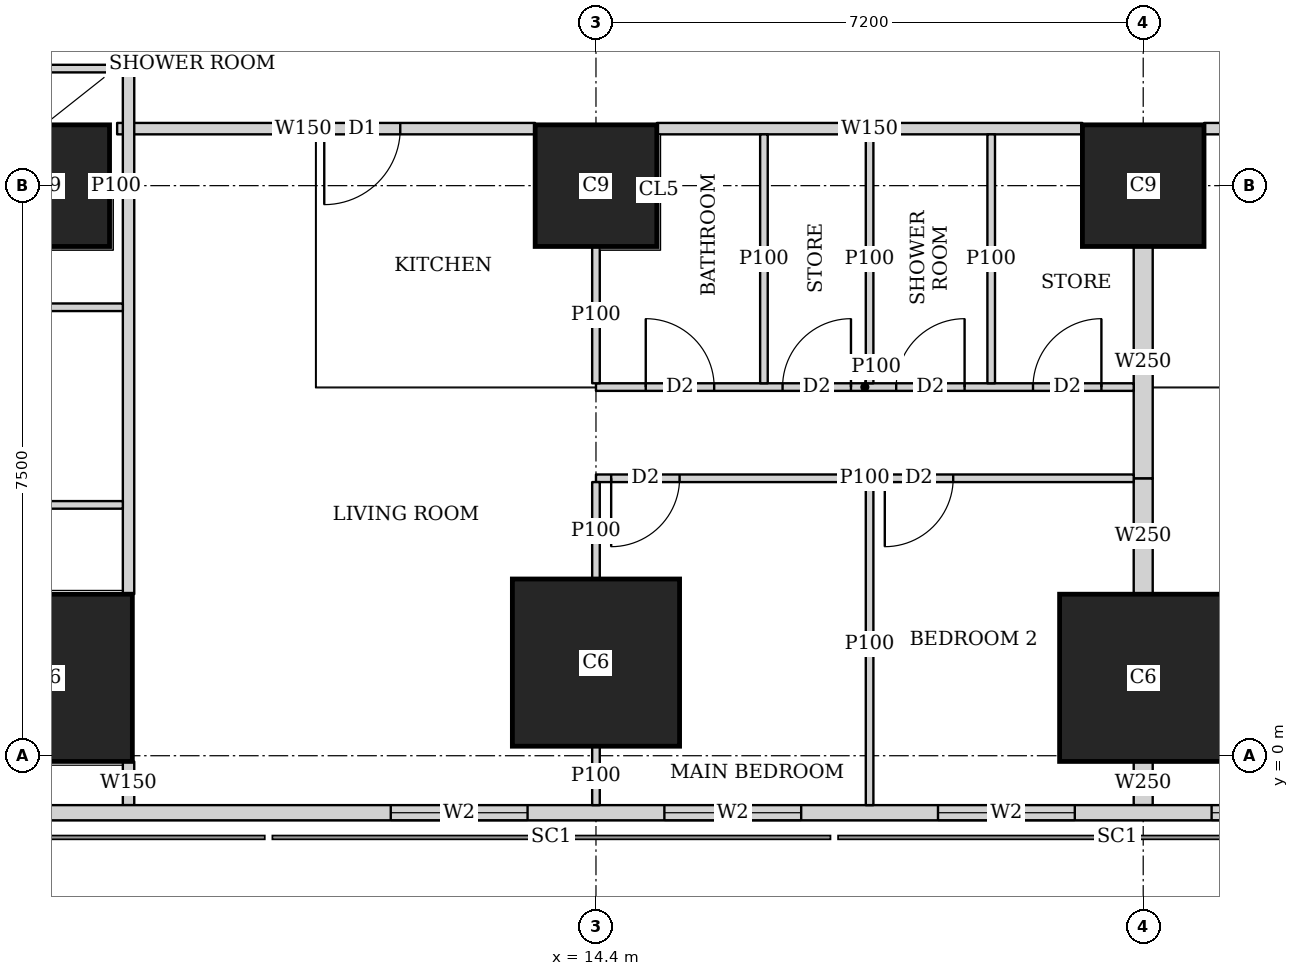
"""IFC4 building model, lengths in metres.
Left out: names, types, materials, properties, quantities, classifications, styles, units other than length and angle.
Written with IfcOpenShell. Run it as: python <this file> out.ifc"""

import sys

from ifc_helpers import new_model, si_unit, direction, frame, frame_2d, origin, origin_2d, place, context, subcontext, project, spatial, rectangle, extrude, element, fill, save


model = new_model("IFC4")
c1 = context("Model", 3, precision=1e-05, world=origin(), true_north=direction((0.0, 1.0)))
c2 = subcontext(c1, "Body", "Model", "MODEL_VIEW")
j1 = project(units=[si_unit("LENGTHUNIT", "METRE"), si_unit("PLANEANGLEUNIT", "RADIAN")], contexts=[c1])
p1 = place(None, origin())
s1 = spatial("IfcSite", under=j1, at=p1, CompositionType="ELEMENT")
p2 = place(p1, origin())
s2 = spatial("IfcBuilding", under=s1, at=p2, CompositionType="ELEMENT")
p3 = place(p2, frame((0.0, 0.0, 126.65)))
s3 = spatial("IfcBuildingStorey", under=s2, at=p3, CompositionType="ELEMENT", Elevation=126.65)
for number, where, z_axis, x_axis in (
    (1, (7.2, 1.025, 0.0), (0.0, 0.0, 1.0), (1.0, 0.0, 0.0)),
    (2, (14.4, 1.225, 0.0), (0.0, 0.0, 1.0), (1.0, 0.0, 0.0)),
    (3, (21.6, 1.025, 0.0), (0.0, 0.0, 1.0), (1.0, 0.0, 0.0)),
):
    element("IfcColumn", number, at=place(p3, frame(where, z_axis=z_axis, x_axis=x_axis)), inside=s3, PredefinedType="COLUMN", context=c2, shape_type="SweptSolid", body=[
        extrude(rectangle(XDim=2.2, YDim=2.2, at=origin_2d()), origin(), (0.0, 0.0, 1.0), 3.75),
    ])
for number, where, z_axis, x_axis in (
    (4, (7.2, 7.5, 0.0), (0.0, 0.0, 1.0), (1.0, 0.0, 0.0)),
    (5, (14.4, 7.5, 0.0), (0.0, 0.0, 1.0), (1.0, 0.0, 0.0)),
    (6, (21.6, 7.5, 0.0), (0.0, 0.0, 1.0), (1.0, 0.0, 0.0)),
):
    element("IfcColumn", number, at=place(p3, frame(where, z_axis=z_axis, x_axis=x_axis)), inside=s3, PredefinedType="COLUMN", context=c2, shape_type="SweptSolid", body=[
        extrude(rectangle(XDim=1.6, YDim=1.6, at=origin_2d()), origin(), (0.0, 0.0, 1.0), 3.75),
    ])
p4 = place(p3, frame((2.163, -0.75, 0.0), z_axis=(0.0, 0.0, 1.0), x_axis=(1.0, 0.0, 0.0)))
e7 = element("IfcWall", 7, at=p4, inside=s3, PredefinedType="SOLIDWALL", context=c2, shape_type="SweptSolid", body=[
    extrude(rectangle(XDim=45.628, YDim=0.2, at=frame_2d((22.814, 0.0))), origin(), (0.0, 0.0, 1.0), 3.45),
])
p5 = place(p4, frame((9.537, 0.0, 0.9)))
e8 = element("IfcOpeningElement", 8, at=p5, cuts=e7, PredefinedType="OPENING", context=c2, shape_type="SweptSolid", body=[
    extrude(rectangle(XDim=1.8, YDim=1.5, at=frame_2d((0.9, 0.75))), frame((0.0, 0.11, 0.0), z_axis=(0.0, -1.0, 0.0), x_axis=(1.0, 0.0, 0.0)), (0.0, 0.0, 1.0), 0.22),
])
p6 = place(p4, frame((13.137, 0.0, 0.9)))
e9 = element("IfcOpeningElement", 9, at=p6, cuts=e7, PredefinedType="OPENING", context=c2, shape_type="SweptSolid", body=[
    extrude(rectangle(XDim=1.8, YDim=1.5, at=frame_2d((0.9, 0.75))), frame((0.0, 0.11, 0.0), z_axis=(0.0, -1.0, 0.0), x_axis=(1.0, 0.0, 0.0)), (0.0, 0.0, 1.0), 0.22),
])
p7 = place(p4, frame((16.737, 0.0, 0.9)))
e10 = element("IfcOpeningElement", 10, at=p7, cuts=e7, PredefinedType="OPENING", context=c2, shape_type="SweptSolid", body=[
    extrude(rectangle(XDim=1.8, YDim=1.5, at=frame_2d((0.9, 0.75))), frame((0.0, 0.11, 0.0), z_axis=(0.0, -1.0, 0.0), x_axis=(1.0, 0.0, 0.0)), (0.0, 0.0, 1.0), 0.22),
])
p8 = place(p4, frame((20.337, 0.0, 0.9)))
e11 = element("IfcOpeningElement", 11, at=p8, cuts=e7, PredefinedType="OPENING", context=c2, shape_type="SweptSolid", body=[
    extrude(rectangle(XDim=1.8, YDim=1.5, at=frame_2d((0.9, 0.75))), frame((0.0, 0.11, 0.0), z_axis=(0.0, -1.0, 0.0), x_axis=(1.0, 0.0, 0.0)), (0.0, 0.0, 1.0), 0.22),
])
p9 = place(p4, frame((23.937, 0.0, 0.9)))
e12 = element("IfcOpeningElement", 12, at=p9, cuts=e7, PredefinedType="OPENING", context=c2, shape_type="SweptSolid", body=[
    extrude(rectangle(XDim=1.8, YDim=1.5, at=frame_2d((0.9, 0.75))), frame((0.0, 0.11, 0.0), z_axis=(0.0, -1.0, 0.0), x_axis=(1.0, 0.0, 0.0)), (0.0, 0.0, 1.0), 0.22),
])
p10 = place(p4, frame((27.537, 0.0, 0.9)))
e13 = element("IfcOpeningElement", 13, at=p10, cuts=e7, PredefinedType="OPENING", context=c2, shape_type="SweptSolid", body=[
    extrude(rectangle(XDim=1.8, YDim=1.5, at=frame_2d((0.9, 0.75))), frame((0.0, 0.11, 0.0), z_axis=(0.0, -1.0, 0.0), x_axis=(1.0, 0.0, 0.0)), (0.0, 0.0, 1.0), 0.22),
])
p11 = place(p4, frame((31.137, 0.0, 0.9)))
e14 = element("IfcOpeningElement", 14, at=p11, cuts=e7, PredefinedType="OPENING", context=c2, shape_type="SweptSolid", body=[
    extrude(rectangle(XDim=1.8, YDim=1.5, at=frame_2d((0.9, 0.75))), frame((0.0, 0.11, 0.0), z_axis=(0.0, -1.0, 0.0), x_axis=(1.0, 0.0, 0.0)), (0.0, 0.0, 1.0), 0.22),
])
p12 = place(p4, frame((34.737, 0.0, 0.9)))
e15 = element("IfcOpeningElement", 15, at=p12, cuts=e7, PredefinedType="OPENING", context=c2, shape_type="SweptSolid", body=[
    extrude(rectangle(XDim=1.8, YDim=1.5, at=frame_2d((0.9, 0.75))), frame((0.0, 0.11, 0.0), z_axis=(0.0, -1.0, 0.0), x_axis=(1.0, 0.0, 0.0)), (0.0, 0.0, 1.0), 0.22),
])
p13 = place(p3, frame((8.25, -0.65, 0.0), z_axis=(0.0, 0.0, 1.0), x_axis=(0.0, 1.0, 0.0)))
e16 = element("IfcWall", 16, at=p13, inside=s3, PredefinedType="SOLIDWALL", context=c2, shape_type="SweptSolid", body=[
    extrude(rectangle(XDim=0.574, YDim=0.15, at=frame_2d((0.287, 0.0))), origin(), (0.0, 0.0, 1.0), 3.45),
])
p14 = place(p3, frame((8.25, 2.126, 0.0), z_axis=(0.0, 0.0, 1.0), x_axis=(0.0, 1.0, 0.0)))
e17 = element("IfcWall", 17, at=p14, inside=s3, PredefinedType="SOLIDWALL", context=c2, shape_type="SweptSolid", body=[
    extrude(rectangle(XDim=40.773, YDim=0.15, at=frame_2d((20.386, 0.0))), origin(), (0.0, 0.0, 1.0), 3.45),
])
p15 = place(p14, frame((10.286, 0.0, 0.0)))
e18 = element("IfcOpeningElement", 18, at=p15, cuts=e17, PredefinedType="OPENING", context=c2, shape_type="SweptSolid", body=[
    extrude(rectangle(XDim=1.0, YDim=2.1, at=frame_2d((0.5, 1.05))), frame((0.0, 0.085, 0.0), z_axis=(0.0, -1.0, 0.0), x_axis=(1.0, 0.0, 0.0)), (0.0, 0.0, 1.0), 0.17),
])
p16 = place(p14, frame((14.461, 0.0, 0.0)))
e19 = element("IfcOpeningElement", 19, at=p16, cuts=e17, PredefinedType="OPENING", context=c2, shape_type="SweptSolid", body=[
    extrude(rectangle(XDim=1.0, YDim=2.1, at=frame_2d((0.5, 1.05))), frame((0.0, 0.085, 0.0), z_axis=(0.0, -1.0, 0.0), x_axis=(1.0, 0.0, 0.0)), (0.0, 0.0, 1.0), 0.17),
])
p17 = place(p14, frame((21.962, 0.0, 0.0)))
e20 = element("IfcOpeningElement", 20, at=p17, cuts=e17, PredefinedType="OPENING", context=c2, shape_type="SweptSolid", body=[
    extrude(rectangle(XDim=1.0, YDim=2.1, at=frame_2d((0.5, 1.05))), frame((0.0, 0.085, 0.0), z_axis=(0.0, -1.0, 0.0), x_axis=(1.0, 0.0, 0.0)), (0.0, 0.0, 1.0), 0.17),
])
p18 = place(p14, frame((29.461, 0.0, 0.0)))
e21 = element("IfcOpeningElement", 21, at=p18, cuts=e17, PredefinedType="OPENING", context=c2, shape_type="SweptSolid", body=[
    extrude(rectangle(XDim=1.0, YDim=2.1, at=frame_2d((0.5, 1.05))), frame((0.0, 0.085, 0.0), z_axis=(0.0, -1.0, 0.0), x_axis=(1.0, 0.0, 0.0)), (0.0, 0.0, 1.0), 0.17),
])
p19 = place(p3, frame((27.999, 8.25, 0.0), z_axis=(0.0, 0.0, 1.0), x_axis=(-1.0, 0.0, 0.0)))
e22 = element("IfcWall", 22, at=p19, inside=s3, PredefinedType="SOLIDWALL", context=c2, shape_type="SweptSolid", body=[
    extrude(rectangle(XDim=5.598, YDim=0.15, at=frame_2d((2.799, 0.0))), origin(), (0.0, 0.0, 1.0), 3.45),
])
p20 = place(p19, frame((3.899, 0.0, 0.0)))
e23 = element("IfcOpeningElement", 23, at=p20, cuts=e22, PredefinedType="OPENING", context=c2, shape_type="SweptSolid", body=[
    extrude(rectangle(XDim=1.0, YDim=2.1, at=frame_2d((0.5, 1.05))), frame((0.0, 0.085, 0.0), z_axis=(0.0, -1.0, 0.0), x_axis=(1.0, 0.0, 0.0)), (0.0, 0.0, 1.0), 0.17),
])
p21 = place(p3, frame((20.799, 8.25, 0.0), z_axis=(0.0, 0.0, 1.0), x_axis=(-1.0, 0.0, 0.0)))
e24 = element("IfcWall", 24, at=p21, inside=s3, PredefinedType="SOLIDWALL", context=c2, shape_type="SweptSolid", body=[
    extrude(rectangle(XDim=5.598, YDim=0.15, at=frame_2d((2.799, 0.0))), origin(), (0.0, 0.0, 1.0), 3.45),
])
p22 = place(p3, frame((13.599, 8.25, 0.0), z_axis=(0.0, 0.0, 1.0), x_axis=(-1.0, 0.0, 0.0)))
e25 = element("IfcWall", 25, at=p22, inside=s3, PredefinedType="SOLIDWALL", context=c2, shape_type="SweptSolid", body=[
    extrude(rectangle(XDim=5.499, YDim=0.15, at=frame_2d((2.75, 0.0))), origin(), (0.0, 0.0, 1.0), 3.45),
])
p23 = place(p22, frame((1.774, 0.0, 0.0)))
e26 = element("IfcOpeningElement", 26, at=p23, cuts=e25, PredefinedType="OPENING", context=c2, shape_type="SweptSolid", body=[
    extrude(rectangle(XDim=1.0, YDim=2.1, at=frame_2d((0.5, 1.05))), frame((0.0, 0.085, 0.0), z_axis=(0.0, -1.0, 0.0), x_axis=(1.0, 0.0, 0.0)), (0.0, 0.0, 1.0), 0.17),
])
p24 = place(p3, frame((8.001, 7.5, 0.0), z_axis=(0.0, 0.0, 1.0), x_axis=(1.0, 0.0, 0.0)))
e27 = element("IfcWall", 27, at=p24, inside=s3, PredefinedType="PARTITIONING", context=c2, shape_type="SweptSolid", body=[
    extrude(rectangle(XDim=0.174, YDim=0.1, at=frame_2d((0.087, 0.0))), origin(), (0.0, 0.0, 1.0), 3.45),
])
for number, where, z_axis, x_axis in (
    (28, (4.9, 9.04, 0.0), (0.0, 0.0, 1.0), (1.0, 0.0, 0.0)),
    (29, (4.9, 5.9, 0.0), (0.0, 0.0, 1.0), (1.0, 0.0, 0.0)),
):
    element("IfcWall", number, at=place(p3, frame(where, z_axis=z_axis, x_axis=x_axis)), inside=s3, PredefinedType="PARTITIONING", context=c2, shape_type="SweptSolid", body=[
        extrude(rectangle(XDim=3.275, YDim=0.1, at=frame_2d((1.638, 0.0))), origin(), (0.0, 0.0, 1.0), 3.45),
    ])
p25 = place(p3, frame((21.475, 3.65, 0.0), z_axis=(0.0, 0.0, 1.0), x_axis=(-1.0, 0.0, 0.0)))
e30 = element("IfcWall", 30, at=p25, inside=s3, PredefinedType="PARTITIONING", context=c2, shape_type="SweptSolid", body=[
    extrude(rectangle(XDim=7.075, YDim=0.1, at=frame_2d((3.538, 0.0))), origin(), (0.0, 0.0, 1.0), 3.45),
])
p26 = place(p25, frame((5.975, 0.0, 0.0)))
e31 = element("IfcOpeningElement", 31, at=p26, cuts=e30, PredefinedType="OPENING", context=c2, shape_type="SweptSolid", body=[
    extrude(rectangle(XDim=0.9, YDim=2.1, at=frame_2d((0.45, 1.05))), frame((0.0, 0.06, 0.0), z_axis=(0.0, -1.0, 0.0), x_axis=(1.0, 0.0, 0.0)), (0.0, 0.0, 1.0), 0.12),
])
p27 = place(p25, frame((2.375, 0.0, 0.0)))
e32 = element("IfcOpeningElement", 32, at=p27, cuts=e30, PredefinedType="OPENING", context=c2, shape_type="SweptSolid", body=[
    extrude(rectangle(XDim=0.9, YDim=2.1, at=frame_2d((0.45, 1.05))), frame((0.0, 0.06, 0.0), z_axis=(0.0, -1.0, 0.0), x_axis=(1.0, 0.0, 0.0)), (0.0, 0.0, 1.0), 0.12),
])
p28 = place(p3, frame((21.475, 4.85, 0.0), z_axis=(0.0, 0.0, 1.0), x_axis=(-1.0, 0.0, 0.0)))
e33 = element("IfcWall", 33, at=p28, inside=s3, PredefinedType="PARTITIONING", context=c2, shape_type="SweptSolid", body=[
    extrude(rectangle(XDim=7.075, YDim=0.1, at=frame_2d((3.538, 0.0))), origin(), (0.0, 0.0, 1.0), 3.45),
])
p29 = place(p28, frame((5.52, 0.0, 0.0)))
e34 = element("IfcOpeningElement", 34, at=p29, cuts=e33, PredefinedType="OPENING", context=c2, shape_type="SweptSolid", body=[
    extrude(rectangle(XDim=0.9, YDim=2.1, at=frame_2d((0.45, 1.05))), frame((0.0, 0.06, 0.0), z_axis=(0.0, -1.0, 0.0), x_axis=(1.0, 0.0, 0.0)), (0.0, 0.0, 1.0), 0.12),
])
p30 = place(p28, frame((2.225, 0.0, 0.0)))
e35 = element("IfcOpeningElement", 35, at=p30, cuts=e33, PredefinedType="OPENING", context=c2, shape_type="SweptSolid", body=[
    extrude(rectangle(XDim=0.9, YDim=2.1, at=frame_2d((0.45, 1.05))), frame((0.0, 0.06, 0.0), z_axis=(0.0, -1.0, 0.0), x_axis=(1.0, 0.0, 0.0)), (0.0, 0.0, 1.0), 0.12),
])
p31 = place(p28, frame((3.72, 0.0, 0.0)))
e36 = element("IfcOpeningElement", 36, at=p31, cuts=e33, PredefinedType="OPENING", context=c2, shape_type="SweptSolid", body=[
    extrude(rectangle(XDim=0.9, YDim=2.1, at=frame_2d((0.45, 1.05))), frame((0.0, 0.06, 0.0), z_axis=(0.0, -1.0, 0.0), x_axis=(1.0, 0.0, 0.0)), (0.0, 0.0, 1.0), 0.12),
])
p32 = place(p28, frame((0.425, 0.0, 0.0)))
e37 = element("IfcOpeningElement", 37, at=p32, cuts=e33, PredefinedType="OPENING", context=c2, shape_type="SweptSolid", body=[
    extrude(rectangle(XDim=0.9, YDim=2.1, at=frame_2d((0.45, 1.05))), frame((0.0, 0.06, 0.0), z_axis=(0.0, -1.0, 0.0), x_axis=(1.0, 0.0, 0.0)), (0.0, 0.0, 1.0), 0.12),
])
p33 = place(p3, frame((14.4, -0.65, 0.0), z_axis=(0.0, 0.0, 1.0), x_axis=(0.0, 1.0, 0.0)))
e38 = element("IfcWall", 38, at=p33, inside=s3, PredefinedType="PARTITIONING", context=c2, shape_type="SweptSolid", body=[
    extrude(rectangle(XDim=0.774, YDim=0.1, at=frame_2d((0.387, 0.0))), origin(), (0.0, 0.0, 1.0), 3.45),
])
p34 = place(p3, frame((14.4, 2.326, 0.0), z_axis=(0.0, 0.0, 1.0), x_axis=(0.0, 1.0, 0.0)))
e39 = element("IfcWall", 39, at=p34, inside=s3, PredefinedType="PARTITIONING", context=c2, shape_type="SweptSolid", body=[
    extrude(rectangle(XDim=1.274, YDim=0.1, at=frame_2d((0.637, 0.0))), origin(), (0.0, 0.0, 1.0), 3.45),
])
p35 = place(p3, frame((18.0, -0.65, 0.0), z_axis=(0.0, 0.0, 1.0), x_axis=(0.0, 1.0, 0.0)))
e40 = element("IfcWall", 40, at=p35, inside=s3, PredefinedType="PARTITIONING", context=c2, shape_type="SweptSolid", body=[
    extrude(rectangle(XDim=4.25, YDim=0.1, at=frame_2d((2.125, 0.0))), origin(), (0.0, 0.0, 1.0), 2.15),
])
p36 = place(p3, frame((14.4, 4.9, 0.0), z_axis=(0.0, 0.0, 1.0), x_axis=(0.0, 1.0, 0.0)))
e41 = element("IfcWall", 41, at=p36, inside=s3, PredefinedType="PARTITIONING", context=c2, shape_type="SweptSolid", body=[
    extrude(rectangle(XDim=1.799, YDim=0.1, at=frame_2d((0.899, 0.0))), origin(), (0.0, 0.0, 1.0), 3.45),
])
for number, where, z_axis, x_axis in (
    (42, (18.0, 4.9, 0.0), (0.0, 0.0, 1.0), (0.0, 1.0, 0.0)),
    (43, (16.61, 4.9, 0.0), (0.0, 0.0, 1.0), (0.0, 1.0, 0.0)),
    (44, (19.6, 4.9, 0.0), (0.0, 0.0, 1.0), (0.0, 1.0, 0.0)),
):
    element("IfcWall", number, at=place(p3, frame(where, z_axis=z_axis, x_axis=x_axis)), inside=s3, PredefinedType="PARTITIONING", context=c2, shape_type="SweptSolid", body=[
        extrude(rectangle(XDim=3.275, YDim=0.1, at=frame_2d((1.638, 0.0))), origin(), (0.0, 0.0, 1.0), 3.45),
    ])
p37 = place(p3, frame((21.6, -0.65, 0.0), z_axis=(0.0, 0.0, 1.0), x_axis=(0.0, 1.0, 0.0)))
e45 = element("IfcWall", 45, at=p37, inside=s3, PredefinedType="SOLIDWALL", context=c2, shape_type="SweptSolid", body=[
    extrude(rectangle(XDim=0.574, YDim=0.25, at=frame_2d((0.287, 0.0))), origin(), (0.0, 0.0, 1.0), 3.45),
])
p38 = place(p3, frame((21.6, 2.126, 0.0), z_axis=(0.0, 0.0, 1.0), x_axis=(0.0, 1.0, 0.0)))
e46 = element("IfcWall", 46, at=p38, inside=s3, PredefinedType="SOLIDWALL", context=c2, shape_type="SweptSolid", body=[
    extrude(rectangle(XDim=1.524, YDim=0.25, at=frame_2d((0.762, 0.0))), origin(), (0.0, 0.0, 1.0), 3.45),
])
p39 = place(p3, frame((21.6, 3.65, 0.0), z_axis=(0.0, 0.0, 1.0), x_axis=(0.0, 1.0, 0.0)))
e47 = element("IfcWall", 47, at=p39, inside=s3, PredefinedType="SOLIDWALL", context=c2, shape_type="SweptSolid", body=[
    extrude(rectangle(XDim=3.049, YDim=0.25, at=frame_2d((1.524, 0.0))), origin(), (0.0, 0.0, 1.0), 3.45),
])
p40 = place(p3, frame((8.175, 3.3, 0.0), z_axis=(0.0, 0.0, 1.0), x_axis=(-1.0, 0.0, 0.0)))
e48 = element("IfcWall", 48, at=p40, inside=s3, PredefinedType="PARTITIONING", context=c2, shape_type="SweptSolid", body=[
    extrude(rectangle(XDim=3.275, YDim=0.1, at=frame_2d((1.638, 0.0))), origin(), (0.0, 0.0, 1.0), 3.45),
])
p41 = place(p40, frame((2.1, 0.0, 0.0)))
e49 = element("IfcOpeningElement", 49, at=p41, cuts=e48, PredefinedType="OPENING", context=c2, shape_type="SweptSolid", body=[
    extrude(rectangle(XDim=0.9, YDim=2.1, at=frame_2d((0.45, 1.05))), frame((0.0, 0.06, 0.0), z_axis=(0.0, -1.0, 0.0), x_axis=(1.0, 0.0, 0.0)), (0.0, 0.0, 1.0), 0.12),
])
p42 = place(p5, origin())
e50 = element("IfcWindow", 50, at=p42, inside=s3, PartitioningType="SINGLE_PANEL", PredefinedType="WINDOW", context=c2, shape_type="SweptSolid", body=[
    extrude(rectangle(XDim=1.8, YDim=1.5, at=frame_2d((0.9, 0.75))), frame((0.0, 0.03, 0.0), z_axis=(0.0, -1.0, 0.0), x_axis=(1.0, 0.0, 0.0)), (0.0, 0.0, 1.0), 0.06),
])
fill(e8, e50)
p43 = place(p6, origin())
e51 = element("IfcWindow", 51, at=p43, inside=s3, PartitioningType="SINGLE_PANEL", PredefinedType="WINDOW", context=c2, shape_type="SweptSolid", body=[
    extrude(rectangle(XDim=1.8, YDim=1.5, at=frame_2d((0.9, 0.75))), frame((0.0, 0.03, 0.0), z_axis=(0.0, -1.0, 0.0), x_axis=(1.0, 0.0, 0.0)), (0.0, 0.0, 1.0), 0.06),
])
fill(e9, e51)
p44 = place(p7, origin())
e52 = element("IfcWindow", 52, at=p44, inside=s3, PartitioningType="SINGLE_PANEL", PredefinedType="WINDOW", context=c2, shape_type="SweptSolid", body=[
    extrude(rectangle(XDim=1.8, YDim=1.5, at=frame_2d((0.9, 0.75))), frame((0.0, 0.03, 0.0), z_axis=(0.0, -1.0, 0.0), x_axis=(1.0, 0.0, 0.0)), (0.0, 0.0, 1.0), 0.06),
])
fill(e10, e52)
p45 = place(p8, origin())
e53 = element("IfcWindow", 53, at=p45, inside=s3, PartitioningType="SINGLE_PANEL", PredefinedType="WINDOW", context=c2, shape_type="SweptSolid", body=[
    extrude(rectangle(XDim=1.8, YDim=1.5, at=frame_2d((0.9, 0.75))), frame((0.0, 0.03, 0.0), z_axis=(0.0, -1.0, 0.0), x_axis=(1.0, 0.0, 0.0)), (0.0, 0.0, 1.0), 0.06),
])
fill(e11, e53)
p46 = place(p26, origin())
e54 = element("IfcDoor", 54, at=p46, inside=s3, OperationType="SINGLE_SWING_RIGHT", PredefinedType="DOOR", context=c2, shape_type="SweptSolid", body=[
    extrude(rectangle(XDim=0.9, YDim=2.1, at=frame_2d((0.45, 1.05))), frame((0.0, 0.025, 0.0), z_axis=(0.0, -1.0, 0.0), x_axis=(1.0, 0.0, 0.0)), (0.0, 0.0, 1.0), 0.05),
])
fill(e31, e54)
p47 = place(p27, origin())
e55 = element("IfcDoor", 55, at=p47, inside=s3, OperationType="SINGLE_SWING_RIGHT", PredefinedType="DOOR", context=c2, shape_type="SweptSolid", body=[
    extrude(rectangle(XDim=0.9, YDim=2.1, at=frame_2d((0.45, 1.05))), frame((0.0, 0.025, 0.0), z_axis=(0.0, -1.0, 0.0), x_axis=(1.0, 0.0, 0.0)), (0.0, 0.0, 1.0), 0.05),
])
fill(e32, e55)
p48 = place(p29, origin())
e56 = element("IfcDoor", 56, at=p48, inside=s3, OperationType="SINGLE_SWING_LEFT", PredefinedType="DOOR", context=c2, shape_type="SweptSolid", body=[
    extrude(rectangle(XDim=0.9, YDim=2.1, at=frame_2d((0.45, 1.05))), frame((0.0, 0.025, 0.0), z_axis=(0.0, -1.0, 0.0), x_axis=(1.0, 0.0, 0.0)), (0.0, 0.0, 1.0), 0.05),
])
fill(e34, e56)
p49 = place(p30, origin())
e57 = element("IfcDoor", 57, at=p49, inside=s3, OperationType="SINGLE_SWING_RIGHT", PredefinedType="DOOR", context=c2, shape_type="SweptSolid", body=[
    extrude(rectangle(XDim=0.9, YDim=2.1, at=frame_2d((0.45, 1.05))), frame((0.0, 0.025, 0.0), z_axis=(0.0, -1.0, 0.0), x_axis=(1.0, 0.0, 0.0)), (0.0, 0.0, 1.0), 0.05),
])
fill(e35, e57)
p50 = place(p31, origin())
e58 = element("IfcDoor", 58, at=p50, inside=s3, OperationType="SINGLE_SWING_RIGHT", PredefinedType="DOOR", context=c2, shape_type="SweptSolid", body=[
    extrude(rectangle(XDim=0.9, YDim=2.1, at=frame_2d((0.45, 1.05))), frame((0.0, 0.025, 0.0), z_axis=(0.0, -1.0, 0.0), x_axis=(1.0, 0.0, 0.0)), (0.0, 0.0, 1.0), 0.05),
])
fill(e36, e58)
p51 = place(p32, origin())
e59 = element("IfcDoor", 59, at=p51, inside=s3, OperationType="SINGLE_SWING_RIGHT", PredefinedType="DOOR", context=c2, shape_type="SweptSolid", body=[
    extrude(rectangle(XDim=0.9, YDim=2.1, at=frame_2d((0.45, 1.05))), frame((0.0, 0.025, 0.0), z_axis=(0.0, -1.0, 0.0), x_axis=(1.0, 0.0, 0.0)), (0.0, 0.0, 1.0), 0.05),
])
fill(e37, e59)
p52 = place(p23, origin())
e60 = element("IfcDoor", 60, at=p52, inside=s3, OperationType="SINGLE_SWING_RIGHT", PredefinedType="DOOR", context=c2, shape_type="SweptSolid", body=[
    extrude(rectangle(XDim=1.0, YDim=2.1, at=frame_2d((0.5, 1.05))), frame((0.0, 0.025, 0.0), z_axis=(0.0, -1.0, 0.0), x_axis=(1.0, 0.0, 0.0)), (0.0, 0.0, 1.0), 0.05),
])
fill(e26, e60)
save(model, sys.argv[1])
